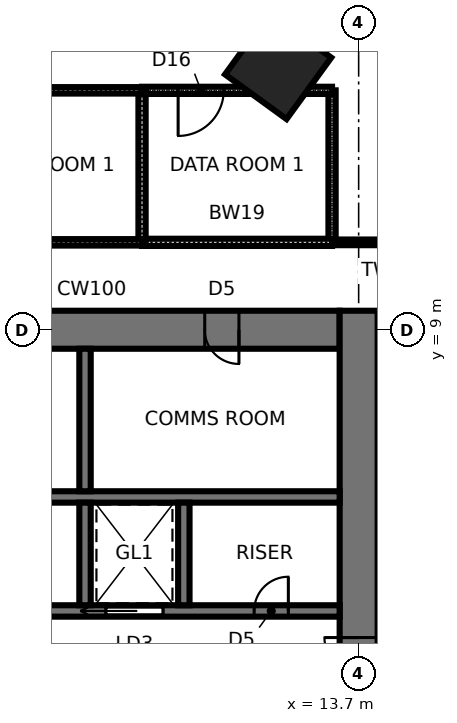
"""IFC4 building model, lengths in metres.
Left out: names, types, materials, properties, quantities, classifications, styles, units other than length and angle.
Written with IfcOpenShell. Run it as: python <this file> out.ifc"""

import sys

from ifc_helpers import new_model, si_unit, direction, frame, frame_2d, origin, origin_2d, place, context, subcontext, project, spatial, rectangle, extrude, element, fill, save


model = new_model("IFC4")
c1 = context("Model", 3, precision=1e-05, world=origin(), true_north=direction((0.0, 1.0)))
c2 = subcontext(c1, "Body", "Model", "MODEL_VIEW")
j1 = project(units=[si_unit("LENGTHUNIT", "METRE"), si_unit("PLANEANGLEUNIT", "RADIAN")], contexts=[c1])
p1 = place(None, origin())
s1 = spatial("IfcSite", under=j1, at=p1, CompositionType="ELEMENT")
p2 = place(p1, origin())
s2 = spatial("IfcBuilding", under=s1, at=p2, CompositionType="ELEMENT")
p3 = place(p2, frame((0.0, 0.0, 32.2)))
s3 = spatial("IfcBuildingStorey", under=s2, at=p3, CompositionType="ELEMENT", Elevation=32.2)
p4 = place(p3, frame((11.581, 15.94, 0.0), z_axis=(0.0, 0.0, 1.0), x_axis=(0.587785252292, 0.809016994375, 0.0)))
e1 = element("IfcColumn", 1, at=p4, inside=s3, PredefinedType="COLUMN", context=c2, shape_type="SweptSolid", body=[
    extrude(rectangle(XDim=2.0, YDim=2.0, at=origin_2d()), origin(), (0.0, 0.0, 1.0), 4.2),
])
p5 = place(p3, frame((13.2, 9.0, 0.0), z_axis=(0.0, 0.0, 1.0), x_axis=(-1.0, 0.0, 0.0)))
e2 = element("IfcWall", 2, at=p5, inside=s3, PredefinedType="SHEAR", context=c2, shape_type="SweptSolid", body=[
    extrude(rectangle(XDim=26.4, YDim=1.0, at=frame_2d((13.2, 0.0))), origin(), (0.0, 0.0, 1.0), 4.2),
])
p6 = place(p5, frame((2.65, 0.0, 0.0)))
e3 = element("IfcOpeningElement", 3, at=p6, cuts=e2, PredefinedType="OPENING", context=c2, shape_type="SweptSolid", body=[
    extrude(rectangle(XDim=0.9, YDim=2.1, at=frame_2d((0.45, 1.05))), frame((0.0, 0.51, 0.0), z_axis=(0.0, -1.0, 0.0), x_axis=(1.0, 0.0, 0.0)), (0.0, 0.0, 1.0), 1.02),
])
p7 = place(p5, frame((9.5, 0.0, 0.0)))
e4 = element("IfcOpeningElement", 4, at=p7, cuts=e2, PredefinedType="OPENING", context=c2, shape_type="SweptSolid", body=[
    extrude(rectangle(XDim=0.9, YDim=2.1, at=frame_2d((0.45, 1.05))), frame((0.0, 0.51, 0.0), z_axis=(0.0, -1.0, 0.0), x_axis=(1.0, 0.0, 0.0)), (0.0, 0.0, 1.0), 1.02),
])
p8 = place(p5, frame((16.0, 0.0, 0.0)))
e5 = element("IfcOpeningElement", 5, at=p8, cuts=e2, PredefinedType="OPENING", context=c2, shape_type="SweptSolid", body=[
    extrude(rectangle(XDim=0.9, YDim=2.1, at=frame_2d((0.45, 1.05))), frame((0.0, 0.51, 0.0), z_axis=(0.0, -1.0, 0.0), x_axis=(1.0, 0.0, 0.0)), (0.0, 0.0, 1.0), 1.02),
])
p9 = place(p5, frame((21.25, 0.0, 0.0)))
e6 = element("IfcOpeningElement", 6, at=p9, cuts=e2, PredefinedType="OPENING", context=c2, shape_type="SweptSolid", body=[
    extrude(rectangle(XDim=0.9, YDim=2.1, at=frame_2d((0.45, 1.05))), frame((0.0, 0.51, 0.0), z_axis=(0.0, -1.0, 0.0), x_axis=(1.0, 0.0, 0.0)), (0.0, 0.0, 1.0), 1.02),
])
p10 = place(p5, frame((24.8, 0.0, 0.0)))
e7 = element("IfcOpeningElement", 7, at=p10, cuts=e2, PredefinedType="OPENING", context=c2, shape_type="SweptSolid", body=[
    extrude(rectangle(XDim=1.0, YDim=2.1, at=frame_2d((0.5, 1.05))), frame((0.0, 0.51, 0.0), z_axis=(0.0, -1.0, 0.0), x_axis=(1.0, 0.0, 0.0)), (0.0, 0.0, 1.0), 1.02),
])
p11 = place(p3, frame((13.7, -9.5, 0.0), z_axis=(0.0, 0.0, 1.0), x_axis=(0.0, 1.0, 0.0)))
e8 = element("IfcWall", 8, at=p11, inside=s3, PredefinedType="SHEAR", context=c2, shape_type="SweptSolid", body=[
    extrude(rectangle(XDim=19.0, YDim=1.0, at=frame_2d((9.5, 0.0))), origin(), (0.0, 0.0, 1.0), 4.2),
])
p12 = place(p11, frame((8.6, 0.0, 0.0)))
e9 = element("IfcOpeningElement", 9, at=p12, cuts=e8, PredefinedType="OPENING", context=c2, shape_type="SweptSolid", body=[
    extrude(rectangle(XDim=1.8, YDim=2.4, at=frame_2d((0.9, 1.2))), frame((0.0, 0.51, 0.0), z_axis=(0.0, -1.0, 0.0), x_axis=(1.0, 0.0, 0.0)), (0.0, 0.0, 1.0), 1.02),
])
p13 = place(p3, frame((-13.2, 1.6, 0.0), z_axis=(0.0, 0.0, 1.0), x_axis=(1.0, 0.0, 0.0)))
e10 = element("IfcWall", 10, at=p13, inside=s3, PredefinedType="SHEAR", context=c2, shape_type="SweptSolid", body=[
    extrude(rectangle(XDim=26.4, YDim=0.3, at=frame_2d((13.2, 0.0))), origin(), (0.0, 0.0, 1.0), 4.2),
])
p14 = place(p13, frame((0.25, 0.0, 0.0)))
e11 = element("IfcOpeningElement", 11, at=p14, cuts=e10, PredefinedType="OPENING", context=c2, shape_type="SweptSolid", body=[
    extrude(rectangle(XDim=1.0, YDim=2.1, at=frame_2d((0.5, 1.05))), frame((0.0, 0.16, 0.0), z_axis=(0.0, -1.0, 0.0), x_axis=(1.0, 0.0, 0.0)), (0.0, 0.0, 1.0), 0.32),
])
p15 = place(p13, frame((20.25, 0.0, 0.0)))
e12 = element("IfcOpeningElement", 12, at=p15, cuts=e10, PredefinedType="OPENING", context=c2, shape_type="SweptSolid", body=[
    extrude(rectangle(XDim=1.5, YDim=2.4, at=frame_2d((0.75, 1.2))), frame((0.0, 0.16, 0.0), z_axis=(0.0, -1.0, 0.0), x_axis=(1.0, 0.0, 0.0)), (0.0, 0.0, 1.0), 0.32),
])
p16 = place(p13, frame((7.45, 0.0, 0.0)))
e13 = element("IfcOpeningElement", 13, at=p16, cuts=e10, PredefinedType="OPENING", context=c2, shape_type="SweptSolid", body=[
    extrude(rectangle(XDim=1.1, YDim=2.3, at=frame_2d((0.55, 1.15))), frame((0.0, 0.16, 0.0), z_axis=(0.0, -1.0, 0.0), x_axis=(1.0, 0.0, 0.0)), (0.0, 0.0, 1.0), 0.32),
])
p17 = place(p13, frame((10.05, 0.0, 0.0)))
e14 = element("IfcOpeningElement", 14, at=p17, cuts=e10, PredefinedType="OPENING", context=c2, shape_type="SweptSolid", body=[
    extrude(rectangle(XDim=1.1, YDim=2.3, at=frame_2d((0.55, 1.15))), frame((0.0, 0.16, 0.0), z_axis=(0.0, -1.0, 0.0), x_axis=(1.0, 0.0, 0.0)), (0.0, 0.0, 1.0), 0.32),
])
p18 = place(p13, frame((12.65, 0.0, 0.0)))
e15 = element("IfcOpeningElement", 15, at=p18, cuts=e10, PredefinedType="OPENING", context=c2, shape_type="SweptSolid", body=[
    extrude(rectangle(XDim=1.1, YDim=2.3, at=frame_2d((0.55, 1.15))), frame((0.0, 0.16, 0.0), z_axis=(0.0, -1.0, 0.0), x_axis=(1.0, 0.0, 0.0)), (0.0, 0.0, 1.0), 0.32),
])
p19 = place(p13, frame((24.15, 0.0, 0.0)))
e16 = element("IfcOpeningElement", 16, at=p19, cuts=e10, PredefinedType="OPENING", context=c2, shape_type="SweptSolid", body=[
    extrude(rectangle(XDim=0.9, YDim=2.1, at=frame_2d((0.45, 1.05))), frame((0.0, 0.16, 0.0), z_axis=(0.0, -1.0, 0.0), x_axis=(1.0, 0.0, 0.0)), (0.0, 0.0, 1.0), 0.32),
])
p20 = place(p3, frame((-13.2, 4.6, 0.0), z_axis=(0.0, 0.0, 1.0), x_axis=(1.0, 0.0, 0.0)))
e17 = element("IfcWall", 17, at=p20, inside=s3, PredefinedType="SHEAR", context=c2, shape_type="SweptSolid", body=[
    extrude(rectangle(XDim=26.4, YDim=0.3, at=frame_2d((13.2, 0.0))), origin(), (0.0, 0.0, 1.0), 4.2),
])
p21 = place(p3, frame((6.5, 1.75, 0.0), z_axis=(0.0, 0.0, 1.0), x_axis=(0.0, 1.0, 0.0)))
e18 = element("IfcWall", 18, at=p21, inside=s3, PredefinedType="SHEAR", context=c2, shape_type="SweptSolid", body=[
    extrude(rectangle(XDim=2.7, YDim=0.3, at=frame_2d((1.35, 0.0))), origin(), (0.0, 0.0, 1.0), 4.2),
])
p22 = place(p3, frame((6.5, 4.75, 0.0), z_axis=(0.0, 0.0, 1.0), x_axis=(0.0, 1.0, 0.0)))
e19 = element("IfcWall", 19, at=p22, inside=s3, PredefinedType="SHEAR", context=c2, shape_type="SweptSolid", body=[
    extrude(rectangle(XDim=3.75, YDim=0.3, at=frame_2d((1.875, 0.0))), origin(), (0.0, 0.0, 1.0), 4.2),
])
p23 = place(p3, frame((9.1, 1.75, 0.0), z_axis=(0.0, 0.0, 1.0), x_axis=(0.0, 1.0, 0.0)))
e20 = element("IfcWall", 20, at=p23, inside=s3, PredefinedType="SHEAR", context=c2, shape_type="SweptSolid", body=[
    extrude(rectangle(XDim=2.7, YDim=0.3, at=frame_2d((1.35, 0.0))), origin(), (0.0, 0.0, 1.0), 4.2),
])
p24 = place(p3, frame((16.0, 11.3, 0.0), z_axis=(0.0, 0.0, 1.0), x_axis=(-1.0, 0.0, 0.0)))
e21 = element("IfcWall", 21, at=p24, inside=s3, PredefinedType="PARTITIONING", context=c2, shape_type="SweptSolid", body=[
    extrude(rectangle(XDim=3.0, YDim=0.15, at=frame_2d((1.5, 0.0))), origin(), (0.0, 0.0, 1.0), 4.04),
])
p25 = place(p3, frame((13.0, 11.3, 0.0), z_axis=(0.0, 0.0, 1.0), x_axis=(0.0, 1.0, 0.0)))
e22 = element("IfcWall", 22, at=p25, inside=s3, PredefinedType="SOLIDWALL", context=c2, shape_type="SweptSolid", body=[
    extrude(rectangle(XDim=4.0, YDim=0.19, at=frame_2d((2.0, 0.0))), origin(), (0.0, 0.0, 1.0), 4.04),
])
p26 = place(p3, frame((8.0, 11.3, 0.0), z_axis=(0.0, 0.0, 1.0), x_axis=(1.0, 0.0, 0.0)))
e23 = element("IfcWall", 23, at=p26, inside=s3, PredefinedType="SOLIDWALL", context=c2, shape_type="SweptSolid", body=[
    extrude(rectangle(XDim=5.0, YDim=0.19, at=frame_2d((2.5, 0.0))), origin(), (0.0, 0.0, 1.0), 4.04),
])
p27 = place(p3, frame((13.0, 15.3, 0.0), z_axis=(0.0, 0.0, 1.0), x_axis=(-1.0, 0.0, 0.0)))
e24 = element("IfcWall", 24, at=p27, inside=s3, PredefinedType="SOLIDWALL", context=c2, shape_type="SweptSolid", body=[
    extrude(rectangle(XDim=5.0, YDim=0.19, at=frame_2d((2.5, 0.0))), origin(), (0.0, 0.0, 1.0), 4.04),
])
p28 = place(p27, frame((2.85, 0.0, 0.0)))
e25 = element("IfcOpeningElement", 25, at=p28, cuts=e24, PredefinedType="OPENING", context=c2, shape_type="SweptSolid", body=[
    extrude(rectangle(XDim=1.2, YDim=2.1, at=frame_2d((0.6, 1.05))), frame((0.0, 0.105, 0.0), z_axis=(0.0, -1.0, 0.0), x_axis=(1.0, 0.0, 0.0)), (0.0, 0.0, 1.0), 0.21),
])
p29 = place(p3, frame((8.0, 15.3, 0.0), z_axis=(0.0, 0.0, 1.0), x_axis=(0.0, -1.0, 0.0)))
e26 = element("IfcWall", 26, at=p29, inside=s3, PredefinedType="SOLIDWALL", context=c2, shape_type="SweptSolid", body=[
    extrude(rectangle(XDim=4.0, YDim=0.19, at=frame_2d((2.0, 0.0))), origin(), (0.0, 0.0, 1.0), 4.04),
])
p30 = place(p3, frame((2.0, 11.3, 0.0), z_axis=(0.0, 0.0, 1.0), x_axis=(1.0, 0.0, 0.0)))
e27 = element("IfcWall", 27, at=p30, inside=s3, PredefinedType="PARTITIONING", context=c2, shape_type="SweptSolid", body=[
    extrude(rectangle(XDim=6.0, YDim=0.17, at=frame_2d((3.0, 0.0))), origin(), (0.0, 0.0, 1.0), 4.04),
])
p31 = place(p3, frame((8.0, 15.3, 0.0), z_axis=(0.0, 0.0, 1.0), x_axis=(-1.0, 0.0, 0.0)))
e28 = element("IfcWall", 28, at=p31, inside=s3, PredefinedType="PARTITIONING", context=c2, shape_type="SweptSolid", body=[
    extrude(rectangle(XDim=6.0, YDim=0.17, at=frame_2d((3.0, 0.0))), origin(), (0.0, 0.0, 1.0), 4.04),
])
p32 = place(p31, frame((2.45, 0.0, 0.0)))
e29 = element("IfcOpeningElement", 29, at=p32, cuts=e28, PredefinedType="OPENING", context=c2, shape_type="SweptSolid", body=[
    extrude(rectangle(XDim=1.1, YDim=2.4, at=frame_2d((0.55, 1.2))), frame((0.0, 0.095, 0.0), z_axis=(0.0, -1.0, 0.0), x_axis=(1.0, 0.0, 0.0)), (0.0, 0.0, 1.0), 0.19),
])
p33 = place(p12, origin())
e30 = element("IfcDoor", 30, at=p33, inside=s3, OperationType="DOUBLE_DOOR_SINGLE_SWING", PredefinedType="DOOR", context=c2, shape_type="SweptSolid", body=[
    extrude(rectangle(XDim=1.72, YDim=2.36, at=frame_2d((0.9, 1.18))), frame((0.0, 0.025, 0.0), z_axis=(0.0, -1.0, 0.0), x_axis=(1.0, 0.0, 0.0)), (0.0, 0.0, 1.0), 0.05),
    extrude(rectangle(XDim=0.04, YDim=2.4, at=frame_2d((0.02, 1.2))), frame((0.0, 0.25, 0.0), z_axis=(0.0, -1.0, 0.0), x_axis=(1.0, 0.0, 0.0)), (0.0, 0.0, 1.0), 0.5),
    extrude(rectangle(XDim=0.04, YDim=2.4, at=frame_2d((1.78, 1.2))), frame((0.0, 0.25, 0.0), z_axis=(0.0, -1.0, 0.0), x_axis=(1.0, 0.0, 0.0)), (0.0, 0.0, 1.0), 0.5),
    extrude(rectangle(XDim=1.72, YDim=0.04, at=frame_2d((0.9, 2.38))), frame((0.0, 0.25, 0.0), z_axis=(0.0, -1.0, 0.0), x_axis=(1.0, 0.0, 0.0)), (0.0, 0.0, 1.0), 0.5),
])
fill(e9, e30)
p34 = place(p15, origin())
e31 = element("IfcDoor", 31, at=p34, inside=s3, OperationType="SLIDING_TO_LEFT", PredefinedType="DOOR", context=c2, shape_type="SweptSolid", body=[
    extrude(rectangle(XDim=1.5, YDim=2.4, at=frame_2d((0.75, 1.2))), frame((0.0, 0.025, 0.0), z_axis=(0.0, -1.0, 0.0), x_axis=(1.0, 0.0, 0.0)), (0.0, 0.0, 1.0), 0.05),
])
fill(e12, e31)
p35 = place(p19, origin())
e32 = element("IfcDoor", 32, at=p35, inside=s3, OperationType="SINGLE_SWING_RIGHT", PredefinedType="DOOR", context=c2, shape_type="SweptSolid", body=[
    extrude(rectangle(XDim=0.9, YDim=2.1, at=frame_2d((0.45, 1.05))), frame((0.0, 0.025, 0.0), z_axis=(0.0, -1.0, 0.0), x_axis=(1.0, 0.0, 0.0)), (0.0, 0.0, 1.0), 0.05),
])
fill(e16, e32)
p36 = place(p6, origin())
e33 = element("IfcDoor", 33, at=p36, inside=s3, OperationType="SINGLE_SWING_LEFT", PredefinedType="DOOR", context=c2, shape_type="SweptSolid", body=[
    extrude(rectangle(XDim=0.82, YDim=2.06, at=frame_2d((0.45, 1.03))), frame((0.0, 0.025, 0.0), z_axis=(0.0, -1.0, 0.0), x_axis=(1.0, 0.0, 0.0)), (0.0, 0.0, 1.0), 0.05),
    extrude(rectangle(XDim=0.04, YDim=2.1, at=frame_2d((0.02, 1.05))), frame((0.0, 0.25, 0.0), z_axis=(0.0, -1.0, 0.0), x_axis=(1.0, 0.0, 0.0)), (0.0, 0.0, 1.0), 0.5),
    extrude(rectangle(XDim=0.04, YDim=2.1, at=frame_2d((0.88, 1.05))), frame((0.0, 0.25, 0.0), z_axis=(0.0, -1.0, 0.0), x_axis=(1.0, 0.0, 0.0)), (0.0, 0.0, 1.0), 0.5),
    extrude(rectangle(XDim=0.82, YDim=0.04, at=frame_2d((0.45, 2.08))), frame((0.0, 0.25, 0.0), z_axis=(0.0, -1.0, 0.0), x_axis=(1.0, 0.0, 0.0)), (0.0, 0.0, 1.0), 0.5),
])
fill(e3, e33)
p37 = place(p28, origin())
e34 = element("IfcDoor", 34, at=p37, inside=s3, OperationType="SINGLE_SWING_RIGHT", PredefinedType="DOOR", context=c2, shape_type="SweptSolid", body=[
    extrude(rectangle(XDim=1.2, YDim=2.1, at=frame_2d((0.6, 1.05))), frame((0.0, 0.025, 0.0), z_axis=(0.0, -1.0, 0.0), x_axis=(1.0, 0.0, 0.0)), (0.0, 0.0, 1.0), 0.05),
])
fill(e25, e34)
save(model, sys.argv[1])
